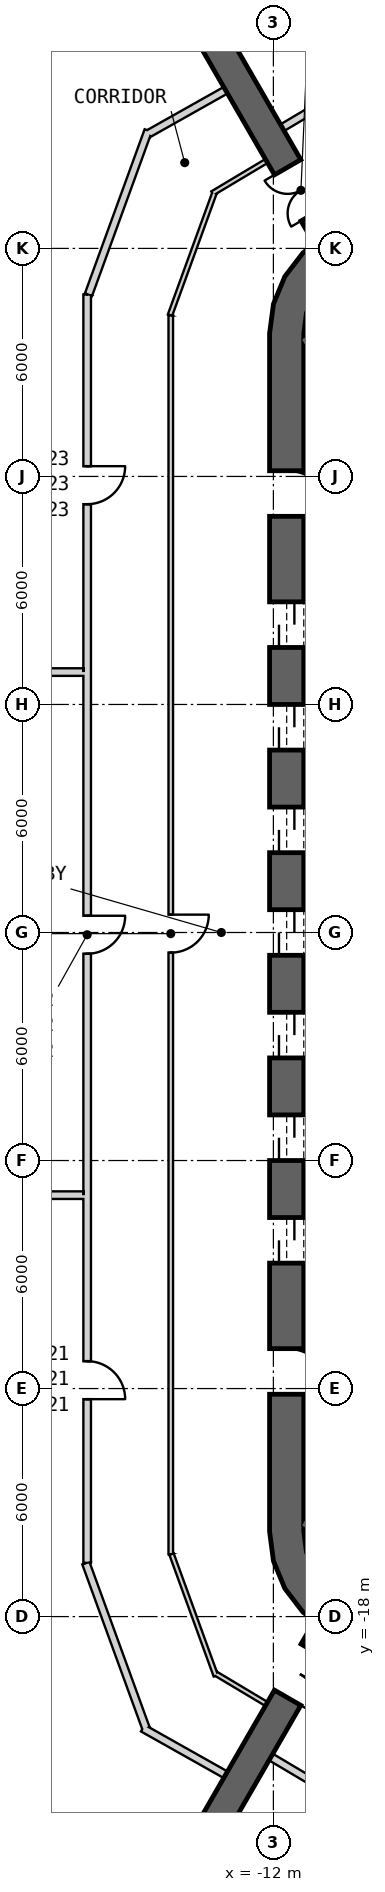
"""IFC4 building model, lengths in metres.
Left out: names, types, materials, properties, quantities, classifications, styles, units other than length and angle.
Written with IfcOpenShell. Run it as: python <this file> out.ifc"""

import sys

from ifc_helpers import new_model, si_unit, direction, frame, frame_2d, origin, place, context, subcontext, project, spatial, polyline, rectangle, outline, extrude, element, fill, save


model = new_model("IFC4")
c1 = context("Model", 3, precision=1e-05, world=origin(), true_north=direction((0.0, 1.0)))
c2 = subcontext(c1, "Body", "Model", "MODEL_VIEW")
j1 = project(units=[si_unit("LENGTHUNIT", "METRE"), si_unit("PLANEANGLEUNIT", "RADIAN")], contexts=[c1])
p1 = place(None, origin())
s1 = spatial("IfcSite", under=j1, at=p1, CompositionType="ELEMENT")
p2 = place(p1, origin())
s2 = spatial("IfcBuilding", under=s1, at=p2, CompositionType="ELEMENT")
p3 = place(p2, frame((0.0, 0.0, 45.5)))
s3 = spatial("IfcBuildingStorey", under=s2, at=p3, CompositionType="ELEMENT", Elevation=45.5)
p4 = place(p3, frame((-11.65, 15.762, 0.0), z_axis=(0.0, 0.0, 1.0), x_axis=(0.0, -1.0, 0.0)))
e1 = element("IfcWall", 1, at=p4, inside=s3, PredefinedType="SHEAR", context=c2, shape_type="SweptSolid", body=[
    extrude(rectangle(XDim=31.523, YDim=0.9, at=frame_2d((15.762, 0.0))), origin(), (0.0, 0.0, 1.0), 4.1),
])
p5 = place(p4, frame((7.062, 0.0, 0.0)))
e2 = element("IfcOpeningElement", 2, at=p5, cuts=e1, PredefinedType="OPENING", context=c2, shape_type="SweptSolid", body=[
    extrude(rectangle(XDim=1.2, YDim=2.4, at=frame_2d((0.6, 1.2))), frame((0.0, 0.46, 0.0), z_axis=(0.0, -1.0, 0.0), x_axis=(1.0, 0.0, 0.0)), (0.0, 0.0, 1.0), 0.92),
])
p6 = place(p4, frame((9.762, 0.0, 0.0)))
e3 = element("IfcOpeningElement", 3, at=p6, cuts=e1, PredefinedType="OPENING", context=c2, shape_type="SweptSolid", body=[
    extrude(rectangle(XDim=1.2, YDim=2.4, at=frame_2d((0.6, 1.2))), frame((0.0, 0.46, 0.0), z_axis=(0.0, -1.0, 0.0), x_axis=(1.0, 0.0, 0.0)), (0.0, 0.0, 1.0), 0.92),
])
p7 = place(p4, frame((12.462, 0.0, 0.0)))
e4 = element("IfcOpeningElement", 4, at=p7, cuts=e1, PredefinedType="OPENING", context=c2, shape_type="SweptSolid", body=[
    extrude(rectangle(XDim=1.2, YDim=2.4, at=frame_2d((0.6, 1.2))), frame((0.0, 0.46, 0.0), z_axis=(0.0, -1.0, 0.0), x_axis=(1.0, 0.0, 0.0)), (0.0, 0.0, 1.0), 0.92),
])
p8 = place(p4, frame((15.162, 0.0, 0.0)))
e5 = element("IfcOpeningElement", 5, at=p8, cuts=e1, PredefinedType="OPENING", context=c2, shape_type="SweptSolid", body=[
    extrude(rectangle(XDim=1.2, YDim=2.4, at=frame_2d((0.6, 1.2))), frame((0.0, 0.46, 0.0), z_axis=(0.0, -1.0, 0.0), x_axis=(1.0, 0.0, 0.0)), (0.0, 0.0, 1.0), 0.92),
])
p9 = place(p4, frame((17.862, 0.0, 0.0)))
e6 = element("IfcOpeningElement", 6, at=p9, cuts=e1, PredefinedType="OPENING", context=c2, shape_type="SweptSolid", body=[
    extrude(rectangle(XDim=1.2, YDim=2.4, at=frame_2d((0.6, 1.2))), frame((0.0, 0.46, 0.0), z_axis=(0.0, -1.0, 0.0), x_axis=(1.0, 0.0, 0.0)), (0.0, 0.0, 1.0), 0.92),
])
p10 = place(p4, frame((20.562, 0.0, 0.0)))
e7 = element("IfcOpeningElement", 7, at=p10, cuts=e1, PredefinedType="OPENING", context=c2, shape_type="SweptSolid", body=[
    extrude(rectangle(XDim=1.2, YDim=2.4, at=frame_2d((0.6, 1.2))), frame((0.0, 0.46, 0.0), z_axis=(0.0, -1.0, 0.0), x_axis=(1.0, 0.0, 0.0)), (0.0, 0.0, 1.0), 0.92),
])
p11 = place(p4, frame((23.262, 0.0, 0.0)))
e8 = element("IfcOpeningElement", 8, at=p11, cuts=e1, PredefinedType="OPENING", context=c2, shape_type="SweptSolid", body=[
    extrude(rectangle(XDim=1.2, YDim=2.4, at=frame_2d((0.6, 1.2))), frame((0.0, 0.46, 0.0), z_axis=(0.0, -1.0, 0.0), x_axis=(1.0, 0.0, 0.0)), (0.0, 0.0, 1.0), 0.92),
])
p12 = place(p4, frame((3.612, 0.0, 0.0)))
e9 = element("IfcOpeningElement", 9, at=p12, cuts=e1, PredefinedType="OPENING", context=c2, shape_type="SweptSolid", body=[
    extrude(rectangle(XDim=1.2, YDim=2.4, at=frame_2d((0.6, 1.2))), frame((0.0, 0.46, 0.0), z_axis=(0.0, -1.0, 0.0), x_axis=(1.0, 0.0, 0.0)), (0.0, 0.0, 1.0), 0.92),
])
p13 = place(p4, frame((26.712, 0.0, 0.0)))
e10 = element("IfcOpeningElement", 10, at=p13, cuts=e1, PredefinedType="OPENING", context=c2, shape_type="SweptSolid", body=[
    extrude(rectangle(XDim=1.2, YDim=2.4, at=frame_2d((0.6, 1.2))), frame((0.0, 0.46, 0.0), z_axis=(0.0, -1.0, 0.0), x_axis=(1.0, 0.0, 0.0)), (0.0, 0.0, 1.0), 0.92),
])
p14 = place(p3, origin())
e11 = element("IfcWall", 11, at=p14, inside=s3, PredefinedType="SHEAR", context=c2, shape_type="SweptSolid", body=[
    extrude(outline(polyline([(-7.6, 18.36), (-8.323, 18.659), (-9.1, 18.762), (-9.876, 18.659), (-10.6, 18.36), (-11.221, 17.883), (-11.698, 17.262), (-11.998, 16.538), (-12.1, 15.762), (-11.2, 15.762), (-11.128, 16.305), (-10.919, 16.812), (-10.585, 17.247), (-10.15, 17.58), (-9.644, 17.79), (-9.1, 17.862), (-8.556, 17.79), (-8.05, 17.58), (-7.6, 18.36)])), origin(), (0.0, 0.0, 1.0), 4.1),
])
p15 = place(p3, origin())
e12 = element("IfcWall", 12, at=p15, inside=s3, PredefinedType="SHEAR", context=c2, shape_type="SweptSolid", body=[
    extrude(outline(polyline([(-12.1, -15.762), (-11.998, -16.538), (-11.698, -17.262), (-11.221, -17.883), (-10.6, -18.36), (-9.876, -18.659), (-9.1, -18.762), (-8.323, -18.659), (-7.6, -18.36), (-8.05, -17.58), (-8.556, -17.79), (-9.1, -17.862), (-9.644, -17.79), (-10.15, -17.58), (-10.585, -17.247), (-10.919, -16.812), (-11.128, -16.305), (-11.2, -15.762), (-12.1, -15.762)])), origin(), (0.0, 0.0, 1.0), 4.1),
])
p16 = place(p3, frame((-10.575, 18.316, 0.0), z_axis=(0.0, 0.0, 1.0), x_axis=(-0.499996272984, 0.866027555568, 0.0)))
e13 = element("IfcWall", 13, at=p16, inside=s3, PredefinedType="SHEAR", context=c2, shape_type="SweptSolid", body=[
    extrude(rectangle(XDim=14.098, YDim=0.8, at=frame_2d((7.049, 0.0))), origin(), (0.0, 0.0, 1.0), 4.1),
])
p17 = place(p16, frame((0.7, 0.0, 0.0)))
e14 = element("IfcOpeningElement", 14, at=p17, cuts=e13, PredefinedType="OPENING", context=c2, shape_type="SweptSolid", body=[
    extrude(rectangle(XDim=1.4, YDim=2.4, at=frame_2d((0.7, 1.2))), frame((0.0, 0.41, 0.0), z_axis=(0.0, -1.0, 0.0), x_axis=(1.0, 0.0, 0.0)), (0.0, 0.0, 1.0), 0.82),
])
p18 = place(p3, frame((-10.575, -18.316, 0.0), z_axis=(0.0, 0.0, 1.0), x_axis=(-0.499996272984, -0.866027555568, 0.0)))
e15 = element("IfcWall", 15, at=p18, inside=s3, PredefinedType="SHEAR", context=c2, shape_type="SweptSolid", body=[
    extrude(rectangle(XDim=14.098, YDim=0.8, at=frame_2d((7.049, 0.0))), origin(), (0.0, 0.0, 1.0), 4.1),
])
p19 = place(p18, frame((0.7, 0.0, 0.0)))
e16 = element("IfcOpeningElement", 16, at=p19, cuts=e15, PredefinedType="OPENING", context=c2, shape_type="SweptSolid", body=[
    extrude(rectangle(XDim=1.4, YDim=2.4, at=frame_2d((0.7, 1.2))), frame((0.0, 0.41, 0.0), z_axis=(0.0, -1.0, 0.0), x_axis=(1.0, 0.0, 0.0)), (0.0, 0.0, 1.0), 0.82),
])
p20 = place(p3, frame((-11.2, 9.42, 0.0), z_axis=(0.0, 0.0, 1.0), x_axis=(0.999957167047, 0.009255488683, 0.0)))
e17 = element("IfcWall", 17, at=p20, inside=s3, PredefinedType="PLUMBINGWALL", context=c2, shape_type="SweptSolid", body=[
    extrude(rectangle(XDim=3.35, YDim=0.2, at=frame_2d((1.675, 0.0))), origin(), (0.0, 0.0, 1.0), 3.8),
])
p21 = place(p3, frame((-8.05, -9.449, 0.0), z_axis=(0.0, 0.0, 1.0), x_axis=(-0.999957467379, 0.009222983926, 0.0)))
e18 = element("IfcWall", 18, at=p21, inside=s3, PredefinedType="PLUMBINGWALL", context=c2, shape_type="SweptSolid", body=[
    extrude(rectangle(XDim=3.15, YDim=0.2, at=frame_2d((1.575, 0.0))), origin(), (0.0, 0.0, 1.0), 3.8),
])
p22 = place(p3, frame((-11.245, 15.678, -0.3), z_axis=(0.0, 0.0, 1.0), x_axis=(0.499977274689, -0.866038523851, 0.0)))
e19 = element("IfcWall", 19, at=p22, inside=s3, PredefinedType="SHEAR", context=c2, shape_type="SweptSolid", body=[
    extrude(rectangle(XDim=8.1, YDim=0.2, at=frame_2d((4.05, 0.0))), origin(), (0.0, 0.0, 1.0), 4.1),
])
p23 = place(p3, frame((-11.282, -15.541, -0.3), z_axis=(0.0, 0.0, 1.0), x_axis=(0.866000483506, -0.500043160704, 0.0)))
e20 = element("IfcWall", 20, at=p23, inside=s3, PredefinedType="SHEAR", context=c2, shape_type="SweptSolid", body=[
    extrude(rectangle(XDim=3.8, YDim=0.2, at=frame_2d((1.9, 0.0))), origin(), (0.0, 0.0, 1.0), 4.1),
])
p24 = place(p3, frame((-7.196, -8.663, -0.3), z_axis=(0.0, 0.0, 1.0), x_axis=(-0.499997992926, -0.866026562566, 0.0)))
e21 = element("IfcWall", 21, at=p24, inside=s3, PredefinedType="SHEAR", context=c2, shape_type="SweptSolid", body=[
    extrude(rectangle(XDim=7.9, YDim=0.2, at=frame_2d((3.95, 0.0))), origin(), (0.0, 0.0, 1.0), 4.1),
])
p25 = place(p3, frame((-12.181, 20.299, 0.0), z_axis=(0.0, 0.0, 1.0), x_axis=(-0.8583241935, -0.51310776534, 0.0)))
e22 = element("IfcWall", 22, at=p25, inside=s3, PredefinedType="PARTITIONING", context=c2, shape_type="SweptSolid", body=[
    extrude(rectangle(XDim=1.656, YDim=0.12, at=frame_2d((0.828, 0.0))), origin(), (0.0, 0.0, 1.0), 3.8),
])
p26 = place(p3, frame((-13.549, 19.461, 0.0), z_axis=(0.0, 0.0, 1.0), x_axis=(-0.341989191955, -0.939703885586, 0.0)))
e23 = element("IfcWall", 23, at=p26, inside=s3, PredefinedType="PARTITIONING", context=c2, shape_type="SweptSolid", body=[
    extrude(rectangle(XDim=3.425, YDim=0.12, at=frame_2d((1.712, 0.0))), origin(), (0.0, 0.0, 1.0), 2.88),
])
p27 = place(p3, frame((-14.7, 16.24, 0.0), z_axis=(0.0, 0.0, 1.0), x_axis=(0.0, -1.0, 0.0)))
e24 = element("IfcWall", 24, at=p27, inside=s3, PredefinedType="PARTITIONING", context=c2, shape_type="SweptSolid", body=[
    extrude(rectangle(XDim=32.599, YDim=0.12, at=frame_2d((16.299, 0.0))), origin(), (0.0, 0.0, 1.0), 2.98),
])
p28 = place(p27, frame((15.77, 0.0, 0.0)))
e25 = element("IfcOpeningElement", 25, at=p28, cuts=e24, PredefinedType="OPENING", context=c2, shape_type="SweptSolid", body=[
    extrude(rectangle(XDim=1.0, YDim=2.1, at=frame_2d((0.5, 1.05))), frame((0.0, 0.07, 0.0), z_axis=(0.0, -1.0, 0.0), x_axis=(1.0, 0.0, 0.0)), (0.0, 0.0, 1.0), 0.14),
])
p29 = place(p3, frame((-14.679, -16.356, 0.0), z_axis=(0.0, 0.0, 1.0), x_axis=(0.342002052592, -0.939699205077, 0.0)))
e26 = element("IfcWall", 26, at=p29, inside=s3, PredefinedType="PARTITIONING", context=c2, shape_type="SweptSolid", body=[
    extrude(rectangle(XDim=3.406, YDim=0.12, at=frame_2d((1.703, 0.0))), origin(), (0.0, 0.0, 1.0), 2.88),
])
p30 = place(p3, frame((-13.516, -19.501, 0.0), z_axis=(0.0, 0.0, 1.0), x_axis=(0.858336816023, -0.513086649856, 0.0)))
e27 = element("IfcWall", 27, at=p30, inside=s3, PredefinedType="PARTITIONING", context=c2, shape_type="SweptSolid", body=[
    extrude(rectangle(XDim=1.555, YDim=0.12, at=frame_2d((0.777, 0.0))), origin(), (0.0, 0.0, 1.0), 3.8),
])
p31 = place(p3, frame((-15.435, -20.935, 0.0), z_axis=(0.0, 0.0, 1.0), x_axis=(0.871392892797, -0.490585799206, 0.0)))
e28 = element("IfcWall", 28, at=p31, inside=s3, PredefinedType="PARTITIONING", context=c2, shape_type="SweptSolid", body=[
    extrude(rectangle(XDim=2.5, YDim=0.2, at=frame_2d((1.25, 0.0))), origin(), (0.0, 0.0, 1.0), 3.8),
])
p32 = place(p3, frame((-16.934, -16.594, 0.0), z_axis=(0.0, 0.0, 1.0), x_axis=(0.342009657388, -0.939696437289, 0.0)))
e29 = element("IfcWall", 29, at=p32, inside=s3, PredefinedType="PARTITIONING", context=c2, shape_type="SweptSolid", body=[
    extrude(rectangle(XDim=4.632, YDim=0.2, at=frame_2d((2.316, 0.0))), origin(), (0.0, 0.0, 1.0), 2.88),
])
p33 = place(p3, frame((-16.9, 16.787, 0.0), z_axis=(0.0, 0.0, 1.0), x_axis=(0.0, -1.0, 0.0)))
e30 = element("IfcWall", 30, at=p33, inside=s3, PredefinedType="PARTITIONING", context=c2, shape_type="SweptSolid", body=[
    extrude(rectangle(XDim=33.375, YDim=0.2, at=frame_2d((16.688, 0.0))), origin(), (0.0, 0.0, 1.0), 2.98),
])
p34 = place(p33, frame((28.067, 0.0, 0.0)))
e31 = element("IfcOpeningElement", 31, at=p34, cuts=e30, PredefinedType="OPENING", context=c2, shape_type="SweptSolid", body=[
    extrude(rectangle(XDim=1.0, YDim=2.1, at=frame_2d((0.5, 1.05))), frame((0.0, 0.11, 0.0), z_axis=(0.0, -1.0, 0.0), x_axis=(1.0, 0.0, 0.0)), (0.0, 0.0, 1.0), 0.22),
])
p35 = place(p33, frame((16.347, 0.0, 0.0)))
e32 = element("IfcOpeningElement", 32, at=p35, cuts=e30, PredefinedType="OPENING", context=c2, shape_type="SweptSolid", body=[
    extrude(rectangle(XDim=1.0, YDim=2.1, at=frame_2d((0.5, 1.05))), frame((0.0, 0.11, 0.0), z_axis=(0.0, -1.0, 0.0), x_axis=(1.0, 0.0, 0.0)), (0.0, 0.0, 1.0), 0.22),
])
p36 = place(p33, frame((4.518, 0.0, 0.0)))
e33 = element("IfcOpeningElement", 33, at=p36, cuts=e30, PredefinedType="OPENING", context=c2, shape_type="SweptSolid", body=[
    extrude(rectangle(XDim=1.0, YDim=2.1, at=frame_2d((0.5, 1.05))), frame((0.0, 0.11, 0.0), z_axis=(0.0, -1.0, 0.0), x_axis=(1.0, 0.0, 0.0)), (0.0, 0.0, 1.0), 0.22),
])
p37 = place(p3, frame((-15.293, 21.102, 0.0), z_axis=(0.0, 0.0, 1.0), x_axis=(-0.341981820704, -0.939706568195, 0.0)))
e34 = element("IfcWall", 34, at=p37, inside=s3, PredefinedType="PARTITIONING", context=c2, shape_type="SweptSolid", body=[
    extrude(rectangle(XDim=4.597, YDim=0.2, at=frame_2d((2.299, 0.0))), origin(), (0.0, 0.0, 1.0), 2.88),
])
p38 = place(p3, frame((-13.257, 22.161, 0.0), z_axis=(0.0, 0.0, 1.0), x_axis=(-0.871385546515, -0.49059884766, 0.0)))
e35 = element("IfcWall", 35, at=p38, inside=s3, PredefinedType="PARTITIONING", context=c2, shape_type="SweptSolid", body=[
    extrude(rectangle(XDim=2.334, YDim=0.2, at=frame_2d((1.167, 0.0))), origin(), (0.0, 0.0, 1.0), 3.8),
])
p39 = place(p3, frame((-10.118, 22.157, 0.0), z_axis=(0.0, 0.0, 1.0), x_axis=(-0.859118225537, -0.511777172752, 0.0)))
e36 = element("IfcWall", 36, at=p39, inside=s3, PredefinedType="PARTITIONING", context=c2, shape_type="SweptSolid", body=[
    extrude(rectangle(XDim=1.917, YDim=0.2, at=frame_2d((0.958, 0.0))), origin(), (0.0, 0.0, 1.0), 3.8),
])
p40 = place(p3, frame((-12.064, -21.696, 0.0), z_axis=(0.0, 0.0, 1.0), x_axis=(0.859769731383, -0.510681905885, 0.0)))
e37 = element("IfcWall", 37, at=p40, inside=s3, PredefinedType="PARTITIONING", context=c2, shape_type="SweptSolid", body=[
    extrude(rectangle(XDim=1.97, YDim=0.2, at=frame_2d((0.985, 0.0))), origin(), (0.0, 0.0, 1.0), 3.8),
])
p41 = place(p3, frame((-17.0, -6.911, 0.0), z_axis=(0.0, 0.0, 1.0), x_axis=(-0.999999996767, -8.0416019e-05, 0.0)))
e38 = element("IfcWall", 38, at=p41, inside=s3, PredefinedType="PARTITIONING", context=c2, shape_type="SweptSolid", body=[
    extrude(rectangle(XDim=9.108, YDim=0.2, at=frame_2d((4.554, 0.0))), origin(), (0.0, 0.0, 1.0), 3.08),
])
p42 = place(p3, frame((-26.109, 6.852, 0.0), z_axis=(0.0, 0.0, 1.0), x_axis=(0.999999998563, 5.3604932e-05, 0.0)))
e39 = element("IfcWall", 39, at=p42, inside=s3, PredefinedType="PARTITIONING", context=c2, shape_type="SweptSolid", body=[
    extrude(rectangle(XDim=9.109, YDim=0.2, at=frame_2d((4.554, 0.0))), origin(), (0.0, 0.0, 1.0), 3.08),
])
p43 = place(p28, origin())
e40 = element("IfcDoor", 40, at=p43, inside=s3, OperationType="SINGLE_SWING_RIGHT", PredefinedType="NOTDEFINED", context=c2, shape_type="SweptSolid", body=[
    extrude(rectangle(XDim=1.0, YDim=2.1, at=frame_2d((0.5, 1.05))), frame((0.0, 0.025, 0.0), z_axis=(0.0, -1.0, 0.0), x_axis=(1.0, 0.0, 0.0)), (0.0, 0.0, 1.0), 0.05),
])
fill(e25, e40)
p44 = place(p34, origin())
e41 = element("IfcDoor", 41, at=p44, inside=s3, OperationType="SINGLE_SWING_RIGHT", PredefinedType="USERDEFINED", context=c2, shape_type="SweptSolid", body=[
    extrude(rectangle(XDim=1.0, YDim=2.1, at=frame_2d((0.5, 1.05))), frame((0.0, 0.025, 0.0), z_axis=(0.0, -1.0, 0.0), x_axis=(1.0, 0.0, 0.0)), (0.0, 0.0, 1.0), 0.05),
])
fill(e31, e41)
p45 = place(p35, origin())
e42 = element("IfcDoor", 42, at=p45, inside=s3, OperationType="SINGLE_SWING_LEFT", PredefinedType="USERDEFINED", context=c2, shape_type="SweptSolid", body=[
    extrude(rectangle(XDim=1.0, YDim=2.1, at=frame_2d((0.5, 1.05))), frame((0.0, 0.025, 0.0), z_axis=(0.0, -1.0, 0.0), x_axis=(1.0, 0.0, 0.0)), (0.0, 0.0, 1.0), 0.05),
])
fill(e32, e42)
p46 = place(p36, origin())
e43 = element("IfcDoor", 43, at=p46, inside=s3, OperationType="SINGLE_SWING_LEFT", PredefinedType="USERDEFINED", context=c2, shape_type="SweptSolid", body=[
    extrude(rectangle(XDim=1.0, YDim=2.1, at=frame_2d((0.5, 1.05))), frame((0.0, 0.025, 0.0), z_axis=(0.0, -1.0, 0.0), x_axis=(1.0, 0.0, 0.0)), (0.0, 0.0, 1.0), 0.05),
])
fill(e33, e43)
p47 = place(p5, origin())
e44 = element("IfcDoor", 44, at=p47, inside=s3, OperationType="SLIDING_TO_LEFT", PredefinedType="USERDEFINED", context=c2, shape_type="SweptSolid", body=[
    extrude(rectangle(XDim=1.2, YDim=2.4, at=frame_2d((0.6, 1.2))), frame((0.0, 0.025, 0.0), z_axis=(0.0, -1.0, 0.0), x_axis=(1.0, 0.0, 0.0)), (0.0, 0.0, 1.0), 0.05),
])
fill(e2, e44)
p48 = place(p6, origin())
e45 = element("IfcDoor", 45, at=p48, inside=s3, OperationType="SLIDING_TO_LEFT", PredefinedType="USERDEFINED", context=c2, shape_type="SweptSolid", body=[
    extrude(rectangle(XDim=1.2, YDim=2.4, at=frame_2d((0.6, 1.2))), frame((0.0, 0.025, 0.0), z_axis=(0.0, -1.0, 0.0), x_axis=(1.0, 0.0, 0.0)), (0.0, 0.0, 1.0), 0.05),
])
fill(e3, e45)
p49 = place(p7, origin())
e46 = element("IfcDoor", 46, at=p49, inside=s3, OperationType="SLIDING_TO_LEFT", PredefinedType="USERDEFINED", context=c2, shape_type="SweptSolid", body=[
    extrude(rectangle(XDim=1.2, YDim=2.4, at=frame_2d((0.6, 1.2))), frame((0.0, 0.025, 0.0), z_axis=(0.0, -1.0, 0.0), x_axis=(1.0, 0.0, 0.0)), (0.0, 0.0, 1.0), 0.05),
])
fill(e4, e46)
p50 = place(p8, origin())
e47 = element("IfcDoor", 47, at=p50, inside=s3, OperationType="SLIDING_TO_LEFT", PredefinedType="USERDEFINED", context=c2, shape_type="SweptSolid", body=[
    extrude(rectangle(XDim=1.2, YDim=2.4, at=frame_2d((0.6, 1.2))), frame((0.0, 0.025, 0.0), z_axis=(0.0, -1.0, 0.0), x_axis=(1.0, 0.0, 0.0)), (0.0, 0.0, 1.0), 0.05),
])
fill(e5, e47)
p51 = place(p9, origin())
e48 = element("IfcDoor", 48, at=p51, inside=s3, OperationType="SLIDING_TO_LEFT", PredefinedType="USERDEFINED", context=c2, shape_type="SweptSolid", body=[
    extrude(rectangle(XDim=1.2, YDim=2.4, at=frame_2d((0.6, 1.2))), frame((0.0, 0.025, 0.0), z_axis=(0.0, -1.0, 0.0), x_axis=(1.0, 0.0, 0.0)), (0.0, 0.0, 1.0), 0.05),
])
fill(e6, e48)
p52 = place(p10, origin())
e49 = element("IfcDoor", 49, at=p52, inside=s3, OperationType="SLIDING_TO_LEFT", PredefinedType="USERDEFINED", context=c2, shape_type="SweptSolid", body=[
    extrude(rectangle(XDim=1.2, YDim=2.4, at=frame_2d((0.6, 1.2))), frame((0.0, 0.025, 0.0), z_axis=(0.0, -1.0, 0.0), x_axis=(1.0, 0.0, 0.0)), (0.0, 0.0, 1.0), 0.05),
])
fill(e7, e49)
p53 = place(p11, origin())
e50 = element("IfcDoor", 50, at=p53, inside=s3, OperationType="SLIDING_TO_LEFT", PredefinedType="USERDEFINED", context=c2, shape_type="SweptSolid", body=[
    extrude(rectangle(XDim=1.2, YDim=2.4, at=frame_2d((0.6, 1.2))), frame((0.0, 0.025, 0.0), z_axis=(0.0, -1.0, 0.0), x_axis=(1.0, 0.0, 0.0)), (0.0, 0.0, 1.0), 0.05),
])
fill(e8, e50)
p54 = place(p12, origin())
e51 = element("IfcDoor", 51, at=p54, inside=s3, OperationType="SINGLE_SWING_RIGHT", PredefinedType="USERDEFINED", context=c2, shape_type="SweptSolid", body=[
    extrude(rectangle(XDim=1.2, YDim=2.4, at=frame_2d((0.6, 1.2))), frame((0.0, 0.025, 0.0), z_axis=(0.0, -1.0, 0.0), x_axis=(1.0, 0.0, 0.0)), (0.0, 0.0, 1.0), 0.05),
])
fill(e9, e51)
p55 = place(p13, origin())
e52 = element("IfcDoor", 52, at=p55, inside=s3, OperationType="SINGLE_SWING_LEFT", PredefinedType="USERDEFINED", context=c2, shape_type="SweptSolid", body=[
    extrude(rectangle(XDim=1.2, YDim=2.4, at=frame_2d((0.6, 1.2))), frame((0.0, 0.025, 0.0), z_axis=(0.0, -1.0, 0.0), x_axis=(1.0, 0.0, 0.0)), (0.0, 0.0, 1.0), 0.05),
])
fill(e10, e52)
p56 = place(p17, origin())
e53 = element("IfcDoor", 53, at=p56, inside=s3, OperationType="DOUBLE_DOOR_SINGLE_SWING", PredefinedType="NOTDEFINED", context=c2, shape_type="SweptSolid", body=[
    extrude(rectangle(XDim=1.4, YDim=2.4, at=frame_2d((0.7, 1.2))), frame((0.0, 0.025, 0.0), z_axis=(0.0, -1.0, 0.0), x_axis=(1.0, 0.0, 0.0)), (0.0, 0.0, 1.0), 0.05),
])
fill(e14, e53)
p57 = place(p19, origin())
e54 = element("IfcDoor", 54, at=p57, inside=s3, OperationType="DOUBLE_DOOR_SINGLE_SWING", PredefinedType="NOTDEFINED", context=c2, shape_type="SweptSolid", body=[
    extrude(rectangle(XDim=1.4, YDim=2.4, at=frame_2d((0.7, 1.2))), frame((0.0, 0.025, 0.0), z_axis=(0.0, -1.0, 0.0), x_axis=(1.0, 0.0, 0.0)), (0.0, 0.0, 1.0), 0.05),
])
fill(e16, e54)
save(model, sys.argv[1])
